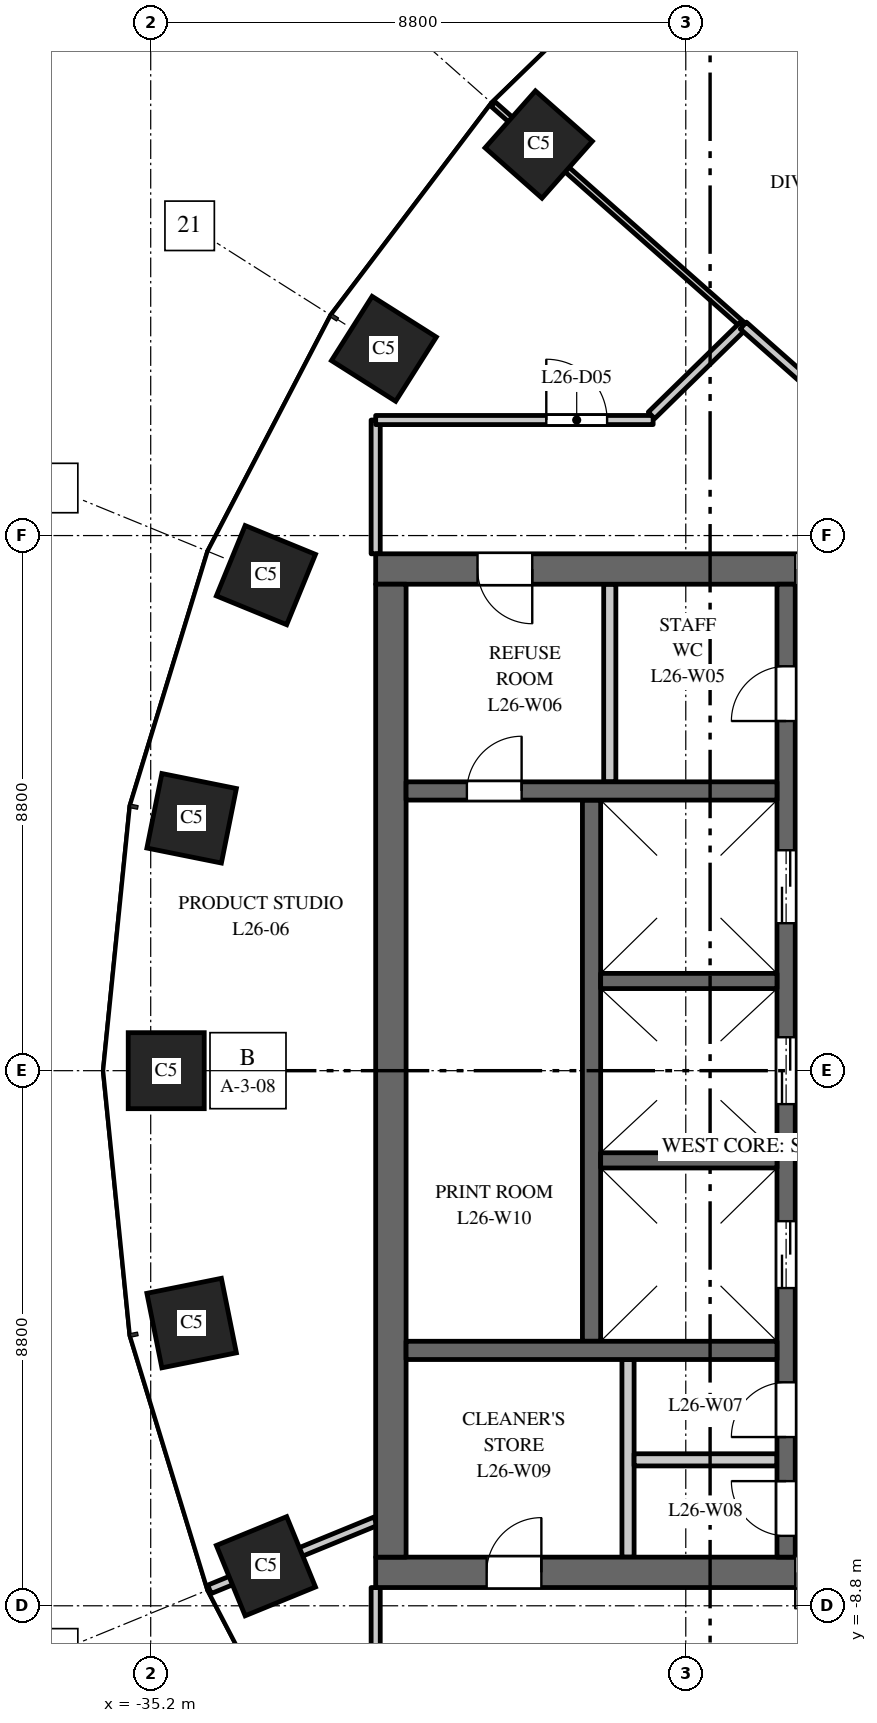
"""IFC4 building model, lengths in metres.
Left out: names, types, materials, properties, quantities, classifications, styles, units other than length and angle.
Written with IfcOpenShell. Run it as: python <this file> out.ifc"""

import sys

from ifc_helpers import new_model, si_unit, direction, frame, frame_2d, origin, origin_2d, place, context, subcontext, project, spatial, rectangle, extrude, element, fill, save


model = new_model("IFC4")
c1 = context("Model", 3, precision=1e-05, world=origin(), true_north=direction((0.0, 1.0)))
c2 = subcontext(c1, "Body", "Model", "MODEL_VIEW")
j1 = project(units=[si_unit("LENGTHUNIT", "METRE"), si_unit("PLANEANGLEUNIT", "RADIAN")], contexts=[c1])
p1 = place(None, origin())
s1 = spatial("IfcSite", under=j1, at=p1, CompositionType="ELEMENT")
p2 = place(p1, origin())
s2 = spatial("IfcBuilding", under=s1, at=p2, CompositionType="ELEMENT")
p3 = place(p2, frame((0.0, 0.0, 116.0)))
s3 = spatial("IfcBuildingStorey", under=s2, at=p3, CompositionType="ELEMENT", Elevation=116.0)
for number, where, z_axis, x_axis in (
    (1, (-28.819, 15.23, 0.0), (0.0, 0.0, 1.0), (-0.663, -0.749, 0.0)),
    (2, (-31.365, 11.871, 0.0), (0.0, 0.0, 1.0), (-0.535, -0.845, 0.0)),
    (3, (-33.305, 8.149, 0.0), (0.0, 0.0, 1.0), (-0.379, -0.925, 0.0)),
    (4, (-34.527, 4.151, 0.0), (0.0, 0.0, 1.0), (-0.197, -0.98, 0.0)),
    (5, (-34.945, 0.0, 0.0), (0.0, 0.0, 1.0), (0.0, -1.0, 0.0)),
    (6, (-34.527, -4.151, 0.0), (0.0, 0.0, 1.0), (0.197, -0.98, 0.0)),
    (7, (-33.305, -8.149, 0.0), (0.0, 0.0, 1.0), (0.379, -0.925, 0.0)),
):
    element("IfcColumn", number, at=place(p3, frame(where, z_axis=z_axis, x_axis=x_axis)), inside=s3, PredefinedType="COLUMN", context=c2, shape_type="SweptSolid", body=[
        extrude(rectangle(XDim=1.25, YDim=1.25, at=origin_2d()), origin(), (0.0, 0.0, 1.0), 4.0),
    ])
p4 = place(p3, frame((-16.5, 8.25, 0.0), z_axis=(0.0, 0.0, 1.0), x_axis=(-1.0, 0.0, 0.0)))
e8 = element("IfcWall", 8, at=p4, inside=s3, PredefinedType="SHEAR", context=c2, shape_type="SweptSolid", body=[
    extrude(rectangle(XDim=15.0, YDim=0.5, at=frame_2d((7.5, 0.0))), origin(), (0.0, 0.0, 1.0), 3.7),
])
p5 = place(p4, frame((6.9, 0.0, 0.0)))
e9 = element("IfcOpeningElement", 9, at=p5, cuts=e8, PredefinedType="OPENING", context=c2, shape_type="SweptSolid", body=[
    extrude(rectangle(XDim=1.2, YDim=2.1, at=frame_2d((0.6, 1.05))), frame((0.0, 0.26, 0.0), z_axis=(0.0, -1.0, 0.0), x_axis=(1.0, 0.0, 0.0)), (0.0, 0.0, 1.0), 0.52),
])
p6 = place(p4, frame((12.425, 0.0, 0.0)))
e10 = element("IfcOpeningElement", 10, at=p6, cuts=e8, PredefinedType="OPENING", context=c2, shape_type="SweptSolid", body=[
    extrude(rectangle(XDim=0.9, YDim=2.1, at=frame_2d((0.45, 1.05))), frame((0.0, 0.26, 0.0), z_axis=(0.0, -1.0, 0.0), x_axis=(1.0, 0.0, 0.0)), (0.0, 0.0, 1.0), 0.52),
])
p7 = place(p3, frame((-16.5, -8.25, 0.0), z_axis=(0.0, 0.0, 1.0), x_axis=(-1.0, 0.0, 0.0)))
e11 = element("IfcWall", 11, at=p7, inside=s3, PredefinedType="SHEAR", context=c2, shape_type="SweptSolid", body=[
    extrude(rectangle(XDim=15.0, YDim=0.5, at=frame_2d((7.5, 0.0))), origin(), (0.0, 0.0, 1.0), 3.7),
])
p8 = place(p7, frame((6.9, 0.0, 0.0)))
e12 = element("IfcOpeningElement", 12, at=p8, cuts=e11, PredefinedType="OPENING", context=c2, shape_type="SweptSolid", body=[
    extrude(rectangle(XDim=1.2, YDim=2.1, at=frame_2d((0.6, 1.05))), frame((0.0, 0.26, 0.0), z_axis=(0.0, -1.0, 0.0), x_axis=(1.0, 0.0, 0.0)), (0.0, 0.0, 1.0), 0.52),
])
p9 = place(p7, frame((12.275, 0.0, 0.0)))
e13 = element("IfcOpeningElement", 13, at=p9, cuts=e11, PredefinedType="OPENING", context=c2, shape_type="SweptSolid", body=[
    extrude(rectangle(XDim=0.9, YDim=2.1, at=frame_2d((0.45, 1.05))), frame((0.0, 0.26, 0.0), z_axis=(0.0, -1.0, 0.0), x_axis=(1.0, 0.0, 0.0)), (0.0, 0.0, 1.0), 0.52),
])
p10 = place(p3, frame((-27.95, -4.45, 0.0), z_axis=(0.0, 0.0, 1.0), x_axis=(0.0, 1.0, 0.0)))
e14 = element("IfcWall", 14, at=p10, inside=s3, PredefinedType="SHEAR", context=c2, shape_type="SweptSolid", body=[
    extrude(rectangle(XDim=8.9, YDim=0.3, at=frame_2d((4.45, 0.0))), origin(), (0.0, 0.0, 1.0), 3.7),
])
p11 = place(p3, frame((-24.75, -8.0, 0.0), z_axis=(0.0, 0.0, 1.0), x_axis=(0.0, 1.0, 0.0)))
e15 = element("IfcWall", 15, at=p11, inside=s3, PredefinedType="SHEAR", context=c2, shape_type="SweptSolid", body=[
    extrude(rectangle(XDim=16.0, YDim=0.3, at=frame_2d((8.0, 0.0))), origin(), (0.0, 0.0, 1.0), 3.7),
])
p12 = place(p11, frame((4.425, 0.0, 0.0)))
e16 = element("IfcOpeningElement", 16, at=p12, cuts=e15, PredefinedType="OPENING", context=c2, shape_type="SweptSolid", body=[
    extrude(rectangle(XDim=1.1, YDim=2.1, at=frame_2d((0.55, 1.05))), frame((0.0, 0.16, 0.0), z_axis=(0.0, -1.0, 0.0), x_axis=(1.0, 0.0, 0.0)), (0.0, 0.0, 1.0), 0.32),
])
p13 = place(p11, frame((7.45, 0.0, 0.0)))
e17 = element("IfcOpeningElement", 17, at=p13, cuts=e15, PredefinedType="OPENING", context=c2, shape_type="SweptSolid", body=[
    extrude(rectangle(XDim=1.1, YDim=2.1, at=frame_2d((0.55, 1.05))), frame((0.0, 0.16, 0.0), z_axis=(0.0, -1.0, 0.0), x_axis=(1.0, 0.0, 0.0)), (0.0, 0.0, 1.0), 0.32),
])
p14 = place(p11, frame((10.425, 0.0, 0.0)))
e18 = element("IfcOpeningElement", 18, at=p14, cuts=e15, PredefinedType="OPENING", context=c2, shape_type="SweptSolid", body=[
    extrude(rectangle(XDim=1.2, YDim=2.1, at=frame_2d((0.6, 1.05))), frame((0.0, 0.16, 0.0), z_axis=(0.0, -1.0, 0.0), x_axis=(1.0, 0.0, 0.0)), (0.0, 0.0, 1.0), 0.32),
])
p15 = place(p11, frame((13.75, 0.0, 0.0)))
e19 = element("IfcOpeningElement", 19, at=p15, cuts=e15, PredefinedType="OPENING", context=c2, shape_type="SweptSolid", body=[
    extrude(rectangle(XDim=0.9, YDim=2.1, at=frame_2d((0.45, 1.05))), frame((0.0, 0.16, 0.0), z_axis=(0.0, -1.0, 0.0), x_axis=(1.0, 0.0, 0.0)), (0.0, 0.0, 1.0), 0.32),
])
p16 = place(p11, frame((1.975, 0.0, 0.0)))
e20 = element("IfcOpeningElement", 20, at=p16, cuts=e15, PredefinedType="OPENING", context=c2, shape_type="SweptSolid", body=[
    extrude(rectangle(XDim=0.9, YDim=2.1, at=frame_2d((0.45, 1.05))), frame((0.0, 0.16, 0.0), z_axis=(0.0, -1.0, 0.0), x_axis=(1.0, 0.0, 0.0)), (0.0, 0.0, 1.0), 0.32),
])
p17 = place(p11, frame((0.35, 0.0, 0.0)))
e21 = element("IfcOpeningElement", 21, at=p17, cuts=e15, PredefinedType="OPENING", context=c2, shape_type="SweptSolid", body=[
    extrude(rectangle(XDim=0.9, YDim=2.1, at=frame_2d((0.45, 1.05))), frame((0.0, 0.16, 0.0), z_axis=(0.0, -1.0, 0.0), x_axis=(1.0, 0.0, 0.0)), (0.0, 0.0, 1.0), 0.32),
])
p18 = place(p3, frame((-31.25, -8.0, 0.0), z_axis=(0.0, 0.0, 1.0), x_axis=(0.0, 1.0, 0.0)))
e22 = element("IfcWall", 22, at=p18, inside=s3, PredefinedType="SHEAR", context=c2, shape_type="SweptSolid", body=[
    extrude(rectangle(XDim=16.0, YDim=0.5, at=frame_2d((8.0, 0.0))), origin(), (0.0, 0.0, 1.0), 3.7),
])
p19 = place(p3, frame((-24.9, 4.6, 0.0), z_axis=(0.0, 0.0, 1.0), x_axis=(-1.0, 0.0, 0.0)))
e23 = element("IfcWall", 23, at=p19, inside=s3, PredefinedType="SHEAR", context=c2, shape_type="SweptSolid", body=[
    extrude(rectangle(XDim=6.1, YDim=0.3, at=frame_2d((3.05, 0.0))), origin(), (0.0, 0.0, 1.0), 3.7),
])
p20 = place(p19, frame((4.2, 0.0, 0.0)))
e24 = element("IfcOpeningElement", 24, at=p20, cuts=e23, PredefinedType="OPENING", context=c2, shape_type="SweptSolid", body=[
    extrude(rectangle(XDim=0.9, YDim=2.1, at=frame_2d((0.45, 1.05))), frame((0.0, 0.16, 0.0), z_axis=(0.0, -1.0, 0.0), x_axis=(1.0, 0.0, 0.0)), (0.0, 0.0, 1.0), 0.32),
])
for number, where, z_axis, x_axis in (
    (25, (-27.65, 4.75, 0.0), (0.0, 0.0, 1.0), (0.0, 1.0, 0.0)),
    (26, (-27.35, -8.0, 0.0), (0.0, 0.0, 1.0), (0.0, 1.0, 0.0)),
):
    element("IfcWall", number, at=place(p3, frame(where, z_axis=z_axis, x_axis=x_axis)), inside=s3, PredefinedType="PARTITIONING", context=c2, shape_type="SweptSolid", body=[
        extrude(rectangle(XDim=3.25, YDim=0.2, at=frame_2d((1.625, 0.0))), origin(), (0.0, 0.0, 1.0), 3.7),
    ])
p21 = place(p3, frame((-24.9, -6.4, 0.0), z_axis=(0.0, 0.0, 1.0), x_axis=(-1.0, 0.0, 0.0)))
e27 = element("IfcWall", 27, at=p21, inside=s3, PredefinedType="PARTITIONING", context=c2, shape_type="SweptSolid", body=[
    extrude(rectangle(XDim=2.35, YDim=0.2, at=frame_2d((1.175, 0.0))), origin(), (0.0, 0.0, 1.0), 3.7),
])
p22 = place(p3, frame((-24.9, -4.6, 0.0), z_axis=(0.0, 0.0, 1.0), x_axis=(-1.0, 0.0, 0.0)))
e28 = element("IfcWall", 28, at=p22, inside=s3, PredefinedType="SHEAR", context=c2, shape_type="SweptSolid", body=[
    extrude(rectangle(XDim=6.1, YDim=0.3, at=frame_2d((3.05, 0.0))), origin(), (0.0, 0.0, 1.0), 3.7),
])
for number, where, z_axis, x_axis in (
    (29, (-24.9, -1.475, 0.0), (0.0, 0.0, 1.0), (-1.0, 0.0, 0.0)),
    (30, (-24.9, 1.475, 0.0), (0.0, 0.0, 1.0), (-1.0, 0.0, 0.0)),
):
    element("IfcWall", number, at=place(p3, frame(where, z_axis=z_axis, x_axis=x_axis)), inside=s3, PredefinedType="SHEAR", context=c2, shape_type="SweptSolid", body=[
        extrude(rectangle(XDim=2.9, YDim=0.25, at=frame_2d((1.45, 0.0))), origin(), (0.0, 0.0, 1.0), 3.7),
    ])
p23 = place(p3, frame((-34.234, -8.53, 0.0), z_axis=(0.0, 0.0, 1.0), x_axis=(0.925344112436, 0.379128307542, 0.0)))
e31 = element("IfcWall", 31, at=p23, inside=s3, PredefinedType="PARTITIONING", context=c2, shape_type="SweptSolid", body=[
    extrude(rectangle(XDim=2.954, YDim=0.15, at=frame_2d((1.477, 0.0))), origin(), (0.0, 0.0, 1.0), 2.9),
])
for number, where, z_axis, x_axis in (
    (32, (-31.5, -10.7, 0.0), (0.0, 0.0, 1.0), (0.0, 1.0, 0.0)),
    (33, (-31.5, 8.5, 0.0), (0.0, 0.0, 1.0), (0.0, 1.0, 0.0)),
):
    element("IfcWall", number, at=place(p3, frame(where, z_axis=z_axis, x_axis=x_axis)), inside=s3, PredefinedType="PARTITIONING", context=c2, shape_type="SweptSolid", body=[
        extrude(rectangle(XDim=2.2, YDim=0.15, at=frame_2d((1.1, 0.0))), origin(), (0.0, 0.0, 1.0), 3.7),
    ])
p24 = place(p3, frame((-31.5, 10.7, 0.0), z_axis=(0.0, 0.0, 1.0), x_axis=(1.0, 0.0, 0.0)))
e34 = element("IfcWall", 34, at=p24, inside=s3, PredefinedType="PARTITIONING", context=c2, shape_type="SweptSolid", body=[
    extrude(rectangle(XDim=4.563, YDim=0.15, at=frame_2d((2.281, 0.0))), origin(), (0.0, 0.0, 1.0), 3.1),
])
p25 = place(p24, frame((2.806, 0.0, 0.0)))
e35 = element("IfcOpeningElement", 35, at=p25, cuts=e34, PredefinedType="OPENING", context=c2, shape_type="SweptSolid", body=[
    extrude(rectangle(XDim=1.0, YDim=2.1, at=frame_2d((0.5, 1.05))), frame((0.0, 0.085, 0.0), z_axis=(0.0, -1.0, 0.0), x_axis=(1.0, 0.0, 0.0)), (0.0, 0.0, 1.0), 0.17),
])
p26 = place(p3, frame((-29.569, 15.895, 0.0), z_axis=(0.0, 0.0, 1.0), x_axis=(0.74891259533, -0.662668789484, 0.0)))
e36 = element("IfcWall", 36, at=p26, inside=s3, PredefinedType="PARTITIONING", context=c2, shape_type="SweptSolid", body=[
    extrude(rectangle(XDim=5.495, YDim=0.1, at=frame_2d((2.747, 0.0))), origin(), (0.0, 0.0, 1.0), 2.9),
])
p27 = place(p3, frame((-26.964, 10.777, 0.0), z_axis=(0.0, 0.0, 1.0), x_axis=(0.714923203438, 0.699202984251, 0.0)))
e37 = element("IfcWall", 37, at=p27, inside=s3, PredefinedType="PARTITIONING", context=c2, shape_type="SweptSolid", body=[
    extrude(rectangle(XDim=2.112, YDim=0.15, at=frame_2d((1.056, 0.0))), origin(), (0.0, 0.0, 1.0), 3.7),
])
p28 = place(p3, frame((-25.454, 12.254, 0.0), z_axis=(0.0, 0.0, 1.0), x_axis=(0.74918446265, -0.662361412617, 0.0)))
e38 = element("IfcWall", 38, at=p28, inside=s3, PredefinedType="PARTITIONING", context=c2, shape_type="SweptSolid", body=[
    extrude(rectangle(XDim=2.455, YDim=0.15, at=frame_2d((1.228, 0.0))), origin(), (0.0, 0.0, 1.0), 3.7),
])
p29 = place(p12, origin())
e39 = element("IfcDoor", 39, at=p29, inside=s3, OperationType="DOUBLE_DOOR_SLIDING", PredefinedType="DOOR", context=c2, shape_type="SweptSolid", body=[
    extrude(rectangle(XDim=1.1, YDim=2.1, at=frame_2d((0.55, 1.05))), frame((0.0, 0.025, 0.0), z_axis=(0.0, -1.0, 0.0), x_axis=(1.0, 0.0, 0.0)), (0.0, 0.0, 1.0), 0.05),
])
fill(e16, e39)
p30 = place(p13, origin())
e40 = element("IfcDoor", 40, at=p30, inside=s3, OperationType="DOUBLE_DOOR_SLIDING", PredefinedType="DOOR", context=c2, shape_type="SweptSolid", body=[
    extrude(rectangle(XDim=1.1, YDim=2.1, at=frame_2d((0.55, 1.05))), frame((0.0, 0.025, 0.0), z_axis=(0.0, -1.0, 0.0), x_axis=(1.0, 0.0, 0.0)), (0.0, 0.0, 1.0), 0.05),
])
fill(e17, e40)
p31 = place(p14, origin())
e41 = element("IfcDoor", 41, at=p31, inside=s3, OperationType="DOUBLE_DOOR_SLIDING", PredefinedType="DOOR", context=c2, shape_type="SweptSolid", body=[
    extrude(rectangle(XDim=1.2, YDim=2.1, at=frame_2d((0.6, 1.05))), frame((0.0, 0.025, 0.0), z_axis=(0.0, -1.0, 0.0), x_axis=(1.0, 0.0, 0.0)), (0.0, 0.0, 1.0), 0.05),
])
fill(e18, e41)
p32 = place(p5, origin())
e42 = element("IfcDoor", 42, at=p32, inside=s3, OperationType="DOUBLE_DOOR_DOUBLE_SWING", PredefinedType="DOOR", context=c2, shape_type="SweptSolid", body=[
    extrude(rectangle(XDim=1.2, YDim=2.1, at=frame_2d((0.6, 1.05))), frame((0.0, 0.025, 0.0), z_axis=(0.0, -1.0, 0.0), x_axis=(1.0, 0.0, 0.0)), (0.0, 0.0, 1.0), 0.05),
])
fill(e9, e42)
p33 = place(p8, origin())
e43 = element("IfcDoor", 43, at=p33, inside=s3, OperationType="DOUBLE_DOOR_DOUBLE_SWING", PredefinedType="DOOR", context=c2, shape_type="SweptSolid", body=[
    extrude(rectangle(XDim=1.2, YDim=2.1, at=frame_2d((0.6, 1.05))), frame((0.0, 0.025, 0.0), z_axis=(0.0, -1.0, 0.0), x_axis=(1.0, 0.0, 0.0)), (0.0, 0.0, 1.0), 0.05),
])
fill(e12, e43)
p34 = place(p15, origin())
e44 = element("IfcDoor", 44, at=p34, inside=s3, OperationType="SINGLE_SWING_RIGHT", PredefinedType="DOOR", context=c2, shape_type="SweptSolid", body=[
    extrude(rectangle(XDim=0.9, YDim=2.1, at=frame_2d((0.45, 1.05))), frame((0.0, 0.025, 0.0), z_axis=(0.0, -1.0, 0.0), x_axis=(1.0, 0.0, 0.0)), (0.0, 0.0, 1.0), 0.05),
])
fill(e19, e44)
p35 = place(p6, origin())
e45 = element("IfcDoor", 45, at=p35, inside=s3, OperationType="SINGLE_SWING_RIGHT", PredefinedType="DOOR", context=c2, shape_type="SweptSolid", body=[
    extrude(rectangle(XDim=0.9, YDim=2.1, at=frame_2d((0.45, 1.05))), frame((0.0, 0.025, 0.0), z_axis=(0.0, -1.0, 0.0), x_axis=(1.0, 0.0, 0.0)), (0.0, 0.0, 1.0), 0.05),
])
fill(e10, e45)
p36 = place(p16, origin())
e46 = element("IfcDoor", 46, at=p36, inside=s3, OperationType="SINGLE_SWING_RIGHT", PredefinedType="DOOR", context=c2, shape_type="SweptSolid", body=[
    extrude(rectangle(XDim=0.9, YDim=2.1, at=frame_2d((0.45, 1.05))), frame((0.0, 0.025, 0.0), z_axis=(0.0, -1.0, 0.0), x_axis=(1.0, 0.0, 0.0)), (0.0, 0.0, 1.0), 0.05),
])
fill(e20, e46)
p37 = place(p17, origin())
e47 = element("IfcDoor", 47, at=p37, inside=s3, OperationType="SINGLE_SWING_LEFT", PredefinedType="DOOR", context=c2, shape_type="SweptSolid", body=[
    extrude(rectangle(XDim=0.9, YDim=2.1, at=frame_2d((0.45, 1.05))), frame((0.0, 0.025, 0.0), z_axis=(0.0, -1.0, 0.0), x_axis=(1.0, 0.0, 0.0)), (0.0, 0.0, 1.0), 0.05),
])
fill(e21, e47)
p38 = place(p9, origin())
e48 = element("IfcDoor", 48, at=p38, inside=s3, OperationType="SINGLE_SWING_LEFT", PredefinedType="DOOR", context=c2, shape_type="SweptSolid", body=[
    extrude(rectangle(XDim=0.9, YDim=2.1, at=frame_2d((0.45, 1.05))), frame((0.0, 0.025, 0.0), z_axis=(0.0, -1.0, 0.0), x_axis=(1.0, 0.0, 0.0)), (0.0, 0.0, 1.0), 0.05),
])
fill(e13, e48)
p39 = place(p20, origin())
e49 = element("IfcDoor", 49, at=p39, inside=s3, OperationType="SINGLE_SWING_LEFT", PredefinedType="DOOR", context=c2, shape_type="SweptSolid", body=[
    extrude(rectangle(XDim=0.9, YDim=2.1, at=frame_2d((0.45, 1.05))), frame((0.0, 0.025, 0.0), z_axis=(0.0, -1.0, 0.0), x_axis=(1.0, 0.0, 0.0)), (0.0, 0.0, 1.0), 0.05),
])
fill(e24, e49)
p40 = place(p25, origin())
e50 = element("IfcDoor", 50, at=p40, inside=s3, OperationType="SINGLE_SWING_LEFT", PredefinedType="DOOR", context=c2, shape_type="SweptSolid", body=[
    extrude(rectangle(XDim=1.0, YDim=2.1, at=frame_2d((0.5, 1.05))), frame((0.0, 0.025, 0.0), z_axis=(0.0, -1.0, 0.0), x_axis=(1.0, 0.0, 0.0)), (0.0, 0.0, 1.0), 0.05),
])
fill(e35, e50)
save(model, sys.argv[1])
